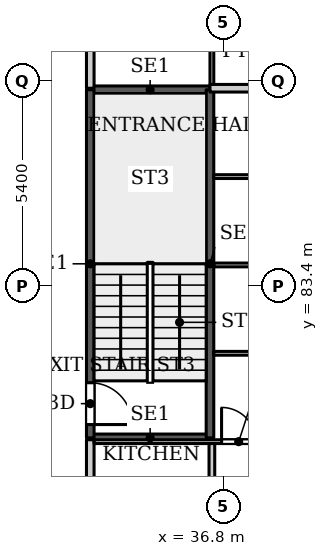
"""IFC4 building model, lengths in metres.
Left out: names, types, materials, properties, quantities, classifications, styles, units other than length and angle.
Written with IfcOpenShell. Run it as: python <this file> out.ifc"""

import sys

from ifc_helpers import new_model, si_unit, direction, frame, frame_2d, origin, place, context, subcontext, project, spatial, rectangle, extrude, source, transform, mapped, element, fill, save


model = new_model("IFC4")
c1 = context("Model", 3, precision=1e-05, world=origin(), true_north=direction((0.0, 1.0)))
c2 = subcontext(c1, "Body", "Model", "MODEL_VIEW")
j1 = project(units=[si_unit("LENGTHUNIT", "METRE"), si_unit("PLANEANGLEUNIT", "RADIAN")], contexts=[c1])
p1 = place(None, origin())
s1 = spatial("IfcSite", under=j1, at=p1, CompositionType="ELEMENT")
p2 = place(p1, origin())
s2 = spatial("IfcBuilding", under=s1, at=p2, CompositionType="ELEMENT")
p3 = place(p2, frame((0.0, 0.0, 65.6)))
s3 = spatial("IfcBuildingStorey", under=s2, at=p3, CompositionType="ELEMENT", Elevation=65.6)
for number, where, z_axis, x_axis in (
    (1, (33.3, 79.4, 0.0), (0.0, 0.0, 1.0), (1.0, 0.0, 0.0)),
    (2, (33.3, 88.56, 0.0), (0.0, 0.0, 1.0), (1.0, 0.0, 0.0)),
):
    element("IfcWall", number, at=place(p3, frame(where, z_axis=z_axis, x_axis=x_axis)), inside=s3, PredefinedType="SHEAR", context=c2, shape_type="SweptSolid", body=[
        extrude(rectangle(XDim=3.15, YDim=0.2, at=frame_2d((1.575, 0.0))), origin(), (0.0, 0.0, 1.0), 3.9),
    ])
p4 = place(p3, frame((33.3, 79.4, 0.0), z_axis=(0.0, 0.0, 1.0), x_axis=(0.0, 1.0, 0.0)))
e3 = element("IfcWall", 3, at=p4, inside=s3, PredefinedType="SHEAR", context=c2, shape_type="SweptSolid", body=[
    extrude(rectangle(XDim=9.16, YDim=0.2, at=frame_2d((4.58, 0.0))), origin(), (0.0, 0.0, 1.0), 3.9),
])
p5 = place(p4, frame((0.35, 0.0, 0.0)))
e4 = element("IfcOpeningElement", 4, at=p5, cuts=e3, PredefinedType="OPENING", context=c2, shape_type="SweptSolid", body=[
    extrude(rectangle(XDim=1.1, YDim=2.2, at=frame_2d((0.55, 1.1))), frame((0.0, 0.11, 0.0), z_axis=(0.0, -1.0, 0.0), x_axis=(1.0, 0.0, 0.0)), (0.0, 0.0, 1.0), 0.22),
])
p6 = place(p3, frame((36.45, 79.4, 0.0), z_axis=(0.0, 0.0, 1.0), x_axis=(0.0, 1.0, 0.0)))
e5 = element("IfcWall", 5, at=p6, inside=s3, PredefinedType="SHEAR", context=c2, shape_type="SweptSolid", body=[
    extrude(rectangle(XDim=9.16, YDim=0.2, at=frame_2d((4.58, 0.0))), origin(), (0.0, 0.0, 1.0), 3.9),
])
p7 = place(p3, frame((33.3, 54.4, 0.0), z_axis=(0.0, 0.0, 1.0), x_axis=(0.0, 1.0, 0.0)))
e6 = element("IfcWall", 6, at=p7, inside=s3, PredefinedType="PARTITIONING", context=c2, shape_type="SweptSolid", body=[
    extrude(rectangle(XDim=24.95, YDim=0.2, at=frame_2d((12.475, 0.0))), origin(), (0.0, 0.0, 1.0), 3.6),
])
p8 = place(p7, frame((3.4, 0.0, 0.0)))
e7 = element("IfcOpeningElement", 7, at=p8, cuts=e6, PredefinedType="OPENING", context=c2, shape_type="SweptSolid", body=[
    extrude(rectangle(XDim=1.0, YDim=2.1, at=frame_2d((0.5, 1.05))), frame((0.0, 0.11, 0.0), z_axis=(0.0, -1.0, 0.0), x_axis=(1.0, 0.0, 0.0)), (0.0, 0.0, 1.0), 0.22),
])
p9 = place(p3, frame((33.3, 88.6, 0.0), z_axis=(0.0, 0.0, 1.0), x_axis=(0.0, 1.0, 0.0)))
e8 = element("IfcWall", 8, at=p9, inside=s3, PredefinedType="PARTITIONING", context=c2, shape_type="SweptSolid", body=[
    extrude(rectangle(XDim=5.175, YDim=0.2, at=frame_2d((2.587, 0.0))), origin(), (0.0, 0.0, 1.0), 3.6),
])
p10 = place(p9, frame((3.7, 0.0, 0.0)))
e9 = element("IfcOpeningElement", 9, at=p10, cuts=e8, PredefinedType="OPENING", context=c2, shape_type="SweptSolid", body=[
    extrude(rectangle(XDim=1.0, YDim=2.1, at=frame_2d((0.5, 1.05))), frame((0.0, 0.11, 0.0), z_axis=(0.0, -1.0, 0.0), x_axis=(1.0, 0.0, 0.0)), (0.0, 0.0, 1.0), 0.22),
])
p11 = place(p3, frame((33.4, 79.3, 0.0), z_axis=(0.0, 0.0, 1.0), x_axis=(1.0, 0.0, 0.0)))
e10 = element("IfcWall", 10, at=p11, inside=s3, PredefinedType="PARTITIONING", context=c2, shape_type="SweptSolid", body=[
    extrude(rectangle(XDim=12.5, YDim=0.1, at=frame_2d((6.25, 0.0))), origin(), (0.0, 0.0, 1.0), 3.6),
])
p12 = place(p11, frame((3.355, 0.0, 0.0)))
e11 = element("IfcOpeningElement", 11, at=p12, cuts=e10, PredefinedType="OPENING", context=c2, shape_type="SweptSolid", body=[
    extrude(rectangle(XDim=0.9, YDim=2.1, at=frame_2d((0.45, 1.05))), frame((0.0, 0.06, 0.0), z_axis=(0.0, -1.0, 0.0), x_axis=(1.0, 0.0, 0.0)), (0.0, 0.0, 1.0), 0.12),
])
p13 = place(p3, frame((36.45, 88.6, 0.0), z_axis=(0.0, 0.0, 1.0), x_axis=(1.0, 0.0, 0.0)))
e12 = element("IfcWall", 12, at=p13, inside=s3, PredefinedType="PARTITIONING", context=c2, shape_type="SweptSolid", body=[
    extrude(rectangle(XDim=9.45, YDim=0.2, at=frame_2d((4.725, 0.0))), origin(), (0.0, 0.0, 1.0), 3.147),
])
p14 = place(p3, frame((36.5, 60.325, 0.0), z_axis=(0.0, 0.0, 1.0), x_axis=(0.0, 1.0, 0.0)))
e13 = element("IfcWall", 13, at=p14, inside=s3, PredefinedType="PARTITIONING", context=c2, shape_type="SweptSolid", body=[
    extrude(rectangle(XDim=18.925, YDim=0.15, at=frame_2d((9.462, 0.0))), origin(), (0.0, 0.0, 1.0), 3.6),
])
p15 = place(p14, frame((8.075, 0.0, 0.0)))
e14 = element("IfcOpeningElement", 14, at=p15, cuts=e13, PredefinedType="OPENING", context=c2, shape_type="SweptSolid", body=[
    extrude(rectangle(XDim=0.8, YDim=2.1, at=frame_2d((0.4, 1.05))), frame((0.0, 0.085, 0.0), z_axis=(0.0, -1.0, 0.0), x_axis=(1.0, 0.0, 0.0)), (0.0, 0.0, 1.0), 0.17),
])
p16 = place(p14, frame((15.425, 0.0, 0.0)))
e15 = element("IfcOpeningElement", 15, at=p16, cuts=e13, PredefinedType="OPENING", context=c2, shape_type="SweptSolid", body=[
    extrude(rectangle(XDim=0.9, YDim=2.1, at=frame_2d((0.45, 1.05))), frame((0.0, 0.085, 0.0), z_axis=(0.0, -1.0, 0.0), x_axis=(1.0, 0.0, 0.0)), (0.0, 0.0, 1.0), 0.17),
])
p17 = place(p14, frame((12.275, 0.0, 0.0)))
e16 = element("IfcOpeningElement", 16, at=p17, cuts=e13, PredefinedType="OPENING", context=c2, shape_type="SweptSolid", body=[
    extrude(rectangle(XDim=0.8, YDim=2.1, at=frame_2d((0.4, 1.05))), frame((0.0, 0.085, 0.0), z_axis=(0.0, -1.0, 0.0), x_axis=(1.0, 0.0, 0.0)), (0.0, 0.0, 1.0), 0.17),
])
p18 = place(p14, frame((1.675, 0.0, 0.0)))
e17 = element("IfcOpeningElement", 17, at=p18, cuts=e13, PredefinedType="OPENING", context=c2, shape_type="SweptSolid", body=[
    extrude(rectangle(XDim=0.8, YDim=2.1, at=frame_2d((0.4, 1.05))), frame((0.0, 0.085, 0.0), z_axis=(0.0, -1.0, 0.0), x_axis=(1.0, 0.0, 0.0)), (0.0, 0.0, 1.0), 0.17),
])
p19 = place(p3, frame((36.5, 88.7, 0.0), z_axis=(0.0, 0.0, 1.0), x_axis=(0.0, 1.0, 0.0)))
e18 = element("IfcWall", 18, at=p19, inside=s3, PredefinedType="PARTITIONING", context=c2, shape_type="SweptSolid", body=[
    extrude(rectangle(XDim=3.25, YDim=0.1, at=frame_2d((1.625, 0.0))), origin(), (0.0, 0.0, 1.0), 3.6),
])
p20 = place(p19, frame((1.1, 0.0, 0.0)))
e19 = element("IfcOpeningElement", 19, at=p20, cuts=e18, PredefinedType="OPENING", context=c2, shape_type="SweptSolid", body=[
    extrude(rectangle(XDim=0.9, YDim=2.1, at=frame_2d((0.45, 1.05))), frame((0.0, 0.06, 0.0), z_axis=(0.0, -1.0, 0.0), x_axis=(1.0, 0.0, 0.0)), (0.0, 0.0, 1.0), 0.12),
])
p21 = place(p3, frame((36.549, 81.625, 0.0), z_axis=(0.0, 0.0, 1.0), x_axis=(1.0, 0.0, 0.0)))
e20 = element("IfcWall", 20, at=p21, inside=s3, PredefinedType="PARTITIONING", context=c2, shape_type="SweptSolid", body=[
    extrude(rectangle(XDim=9.351, YDim=0.1, at=frame_2d((4.675, 0.0))), origin(), (0.0, 0.0, 1.0), 3.6),
])
p22 = place(p21, frame((4.176, 0.0, 0.0)))
e21 = element("IfcOpeningElement", 21, at=p22, cuts=e20, PredefinedType="OPENING", context=c2, shape_type="SweptSolid", body=[
    extrude(rectangle(XDim=0.9, YDim=2.1, at=frame_2d((0.45, 1.05))), frame((0.0, 0.06, 0.0), z_axis=(0.0, -1.0, 0.0), x_axis=(1.0, 0.0, 0.0)), (0.0, 0.0, 1.0), 0.12),
])
p23 = place(p3, frame((36.549, 83.95, 0.0), z_axis=(0.0, 0.0, 1.0), x_axis=(1.0, 0.0, 0.0)))
e22 = element("IfcWall", 22, at=p23, inside=s3, PredefinedType="PARTITIONING", context=c2, shape_type="SweptSolid", body=[
    extrude(rectangle(XDim=9.351, YDim=0.1, at=frame_2d((4.675, 0.0))), origin(), (0.0, 0.0, 1.0), 3.6),
])
p24 = place(p23, frame((4.176, 0.0, 0.0)))
e23 = element("IfcOpeningElement", 23, at=p24, cuts=e22, PredefinedType="OPENING", context=c2, shape_type="SweptSolid", body=[
    extrude(rectangle(XDim=0.9, YDim=2.1, at=frame_2d((0.45, 1.05))), frame((0.0, 0.06, 0.0), z_axis=(0.0, -1.0, 0.0), x_axis=(1.0, 0.0, 0.0)), (0.0, 0.0, 1.0), 0.12),
])
p25 = place(p3, frame((36.549, 86.275, 0.0), z_axis=(0.0, 0.0, 1.0), x_axis=(1.0, 0.0, 0.0)))
e24 = element("IfcWall", 24, at=p25, inside=s3, PredefinedType="PARTITIONING", context=c2, shape_type="SweptSolid", body=[
    extrude(rectangle(XDim=9.351, YDim=0.1, at=frame_2d((4.675, 0.0))), origin(), (0.0, 0.0, 1.0), 3.6),
])
p26 = place(p25, frame((4.176, 0.0, 0.0)))
e25 = element("IfcOpeningElement", 25, at=p26, cuts=e24, PredefinedType="OPENING", context=c2, shape_type="SweptSolid", body=[
    extrude(rectangle(XDim=0.9, YDim=2.1, at=frame_2d((0.45, 1.05))), frame((0.0, 0.06, 0.0), z_axis=(0.0, -1.0, 0.0), x_axis=(1.0, 0.0, 0.0)), (0.0, 0.0, 1.0), 0.12),
])
m1 = source(origin(), c2, "Body", "SweptSolid", [
    extrude(rectangle(XDim=1.1, YDim=2.2, at=frame_2d((0.55, 1.1))), frame((0.0, 0.025, 0.0), z_axis=(0.0, -1.0, 0.0), x_axis=(1.0, 0.0, 0.0)), (0.0, 0.0, 1.0), 0.05),
])
p27 = place(p5, origin())
e26 = element("IfcDoor", 26, at=p27, inside=s3, OperationType="SINGLE_SWING_RIGHT", PredefinedType="DOOR", context=c2, shape_type="MappedRepresentation", body=[
    mapped(m1, transform((0.0, 0.0, 0.0), x_axis=(1.0, 0.0, 0.0), y_axis=(0.0, 1.0, 0.0), z_axis=(0.0, 0.0, 1.0), scale=1.0)),
])
fill(e4, e26)
m2 = source(origin(), c2, "Body", "SweptSolid", [
    extrude(rectangle(XDim=0.9, YDim=2.1, at=frame_2d((0.45, 1.05))), frame((0.0, 0.025, 0.0), z_axis=(0.0, -1.0, 0.0), x_axis=(1.0, 0.0, 0.0)), (0.0, 0.0, 1.0), 0.05),
])
p28 = place(p12, origin())
e27 = element("IfcDoor", 27, at=p28, inside=s3, OperationType="SINGLE_SWING_LEFT", PredefinedType="DOOR", context=c2, shape_type="MappedRepresentation", body=[
    mapped(m2, transform((0.0, 0.0, 0.0), x_axis=(1.0, 0.0, 0.0), y_axis=(0.0, 1.0, 0.0), z_axis=(0.0, 0.0, 1.0), scale=1.0)),
])
fill(e11, e27)
save(model, sys.argv[1])
